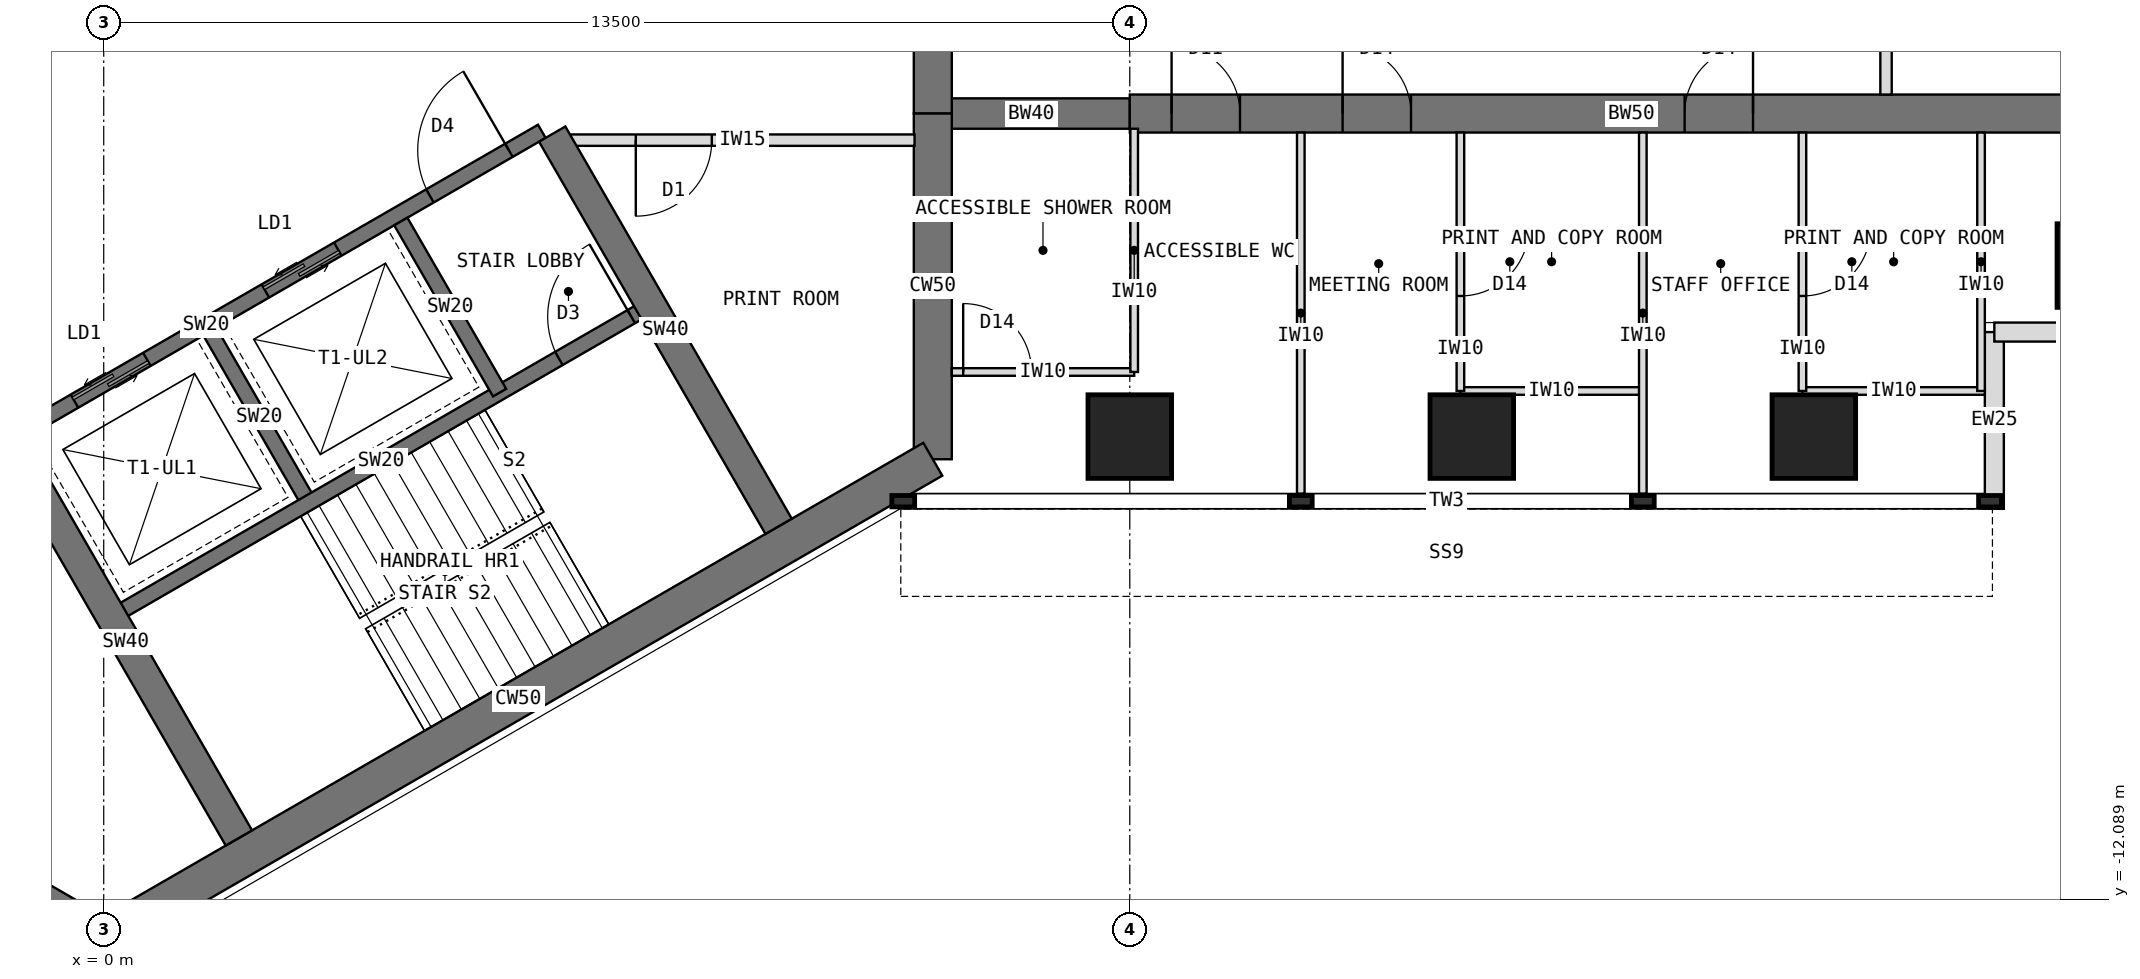
"""IFC4 building model, lengths in metres.
Left out: names, types, materials, properties, quantities, classifications, styles, units other than length and angle.
Written with IfcOpenShell. Run it as: python <this file> out.ifc"""

import sys

from ifc_helpers import new_model, si_unit, direction, frame, frame_2d, origin, origin_2d, place, context, subcontext, project, spatial, rectangle, extrude, element, fill, save


model = new_model("IFC4")
c1 = context("Model", 3, precision=1e-05, world=origin(), true_north=direction((0.0, 1.0)))
c2 = subcontext(c1, "Body", "Model", "MODEL_VIEW")
j1 = project(units=[si_unit("LENGTHUNIT", "METRE"), si_unit("PLANEANGLEUNIT", "RADIAN")], contexts=[c1])
p1 = place(None, origin())
s1 = spatial("IfcSite", under=j1, at=p1, CompositionType="ELEMENT")
p2 = place(p1, origin())
s2 = spatial("IfcBuilding", under=s1, at=p2, CompositionType="ELEMENT")
p3 = place(p2, frame((0.0, 0.0, 230.5)))
s3 = spatial("IfcBuildingStorey", under=s2, at=p3, CompositionType="ELEMENT", Elevation=230.5)
p4 = place(p3, frame((10.908, -6.298, 0.0), z_axis=(0.0, 0.0, 1.0), x_axis=(0.0, 1.0, 0.0)))
e1 = element("IfcWall", 1, at=p4, inside=s3, PredefinedType="SHEAR", context=c2, shape_type="SweptSolid", body=[
    extrude(rectangle(XDim=4.548, YDim=0.5, at=frame_2d((2.274, 0.0))), origin(), (0.0, 0.0, 1.0), 4.0),
])
p5 = place(p3, frame((10.908, -1.75, 0.0), z_axis=(0.0, 0.0, 1.0), x_axis=(0.0, 1.0, 0.0)))
e2 = element("IfcWall", 2, at=p5, inside=s3, PredefinedType="SHEAR", context=c2, shape_type="SweptSolid", body=[
    extrude(rectangle(XDim=3.5, YDim=0.5, at=frame_2d((1.75, 0.0))), origin(), (0.0, 0.0, 1.0), 4.0),
])
p6 = place(p5, frame((0.85, 0.0, 0.0)))
e3 = element("IfcOpeningElement", 3, at=p6, cuts=e2, PredefinedType="OPENING", context=c2, shape_type="SweptSolid", body=[
    extrude(rectangle(XDim=1.8, YDim=2.1, at=frame_2d((0.9, 1.05))), frame((0.0, 0.26, 0.0), z_axis=(0.0, -1.0, 0.0), x_axis=(1.0, 0.0, 0.0)), (0.0, 0.0, 1.0), 0.52),
])
p7 = place(p3, frame((-3.939, -10.322, 0.0), z_axis=(0.0, 0.0, 1.0), x_axis=(0.866011268655, -0.500024481964, 0.0)))
e4 = element("IfcWall", 4, at=p7, inside=s3, PredefinedType="SHEAR", context=c2, shape_type="SweptSolid", body=[
    extrude(rectangle(XDim=4.548, YDim=0.5, at=frame_2d((2.274, 0.0))), origin(), (0.0, 0.0, 1.0), 4.0),
])
p8 = place(p3, frame((0.0, -12.596, 0.0), z_axis=(0.0, 0.0, 1.0), x_axis=(0.866021940709, 0.500005998175, 0.0)))
e5 = element("IfcWall", 5, at=p8, inside=s3, PredefinedType="SHEAR", context=c2, shape_type="SweptSolid", body=[
    extrude(rectangle(XDim=12.596, YDim=0.5, at=frame_2d((6.298, 0.0))), origin(), (0.0, 0.0, 1.0), 4.0),
])
p9 = place(p3, frame((10.908, -1.75, 0.0), z_axis=(0.0, 0.0, 1.0), x_axis=(1.0, 0.0, 0.0)))
e6 = element("IfcWall", 6, at=p9, inside=s3, PredefinedType="SHEAR", context=c2, shape_type="SweptSolid", body=[
    extrude(rectangle(XDim=2.592, YDim=0.4, at=frame_2d((1.296, 0.0))), origin(), (0.0, 0.0, 1.0), 4.0),
])
p10 = place(p3, frame((13.5, -1.75, 0.0), z_axis=(0.0, 0.0, 1.0), x_axis=(1.0, 0.0, 0.0)))
e7 = element("IfcWall", 7, at=p10, inside=s3, PredefinedType="SHEAR", context=c2, shape_type="SweptSolid", body=[
    extrude(rectangle(XDim=13.2, YDim=0.5, at=frame_2d((6.6, 0.0))), origin(), (0.0, 0.0, 1.0), 4.0),
])
p11 = place(p10, frame((0.55, 0.0, 0.0)))
e8 = element("IfcOpeningElement", 8, at=p11, cuts=e7, PredefinedType="OPENING", context=c2, shape_type="SweptSolid", body=[
    extrude(rectangle(XDim=0.9, YDim=2.1, at=frame_2d((0.45, 1.05))), frame((0.0, 0.26, 0.0), z_axis=(0.0, -1.0, 0.0), x_axis=(1.0, 0.0, 0.0)), (0.0, 0.0, 1.0), 0.52),
])
p12 = place(p10, frame((2.8, 0.0, 0.0)))
e9 = element("IfcOpeningElement", 9, at=p12, cuts=e7, PredefinedType="OPENING", context=c2, shape_type="SweptSolid", body=[
    extrude(rectangle(XDim=0.9, YDim=2.1, at=frame_2d((0.45, 1.05))), frame((0.0, 0.26, 0.0), z_axis=(0.0, -1.0, 0.0), x_axis=(1.0, 0.0, 0.0)), (0.0, 0.0, 1.0), 0.52),
])
p13 = place(p10, frame((7.3, 0.0, 0.0)))
e10 = element("IfcOpeningElement", 10, at=p13, cuts=e7, PredefinedType="OPENING", context=c2, shape_type="SweptSolid", body=[
    extrude(rectangle(XDim=0.9, YDim=2.1, at=frame_2d((0.45, 1.05))), frame((0.0, 0.26, 0.0), z_axis=(0.0, -1.0, 0.0), x_axis=(1.0, 0.0, 0.0)), (0.0, 0.0, 1.0), 0.52),
])
for number, where, z_axis, x_axis in (
    (11, (13.5, -6.0, 0.0), (0.0, 0.0, 1.0), (1.0, 0.0, 0.0)),
    (12, (18.0, -6.0, 0.0), (0.0, 0.0, 1.0), (1.0, 0.0, 0.0)),
    (13, (22.5, -6.0, 0.0), (0.0, 0.0, 1.0), (1.0, 0.0, 0.0)),
    (14, (26.25, -3.75, 0.0), (0.0, 0.0, 1.0), (1.0, 0.0, 0.0)),
):
    element("IfcColumn", number, at=place(p3, frame(where, z_axis=z_axis, x_axis=x_axis)), inside=s3, PredefinedType="COLUMN", context=c2, shape_type="SweptSolid", body=[
        extrude(rectangle(XDim=1.1, YDim=1.1, at=origin_2d()), origin(), (0.0, 0.0, 1.0), 4.0),
    ])
for number, where, z_axis, x_axis in (
    (15, (24.875, -6.95, 0.0), (0.0, 0.0, 1.0), (0.0, 1.0, 0.0)),
    (16, (24.875, -4.625, 0.0), (0.0, 0.0, 1.0), (1.0, 0.0, 0.0)),
):
    element("IfcWall", number, at=place(p3, frame(where, z_axis=z_axis, x_axis=x_axis)), inside=s3, PredefinedType="STANDARD", context=c2, shape_type="SweptSolid", body=[
        extrude(rectangle(XDim=2.325, YDim=0.25, at=frame_2d((1.163, 0.0))), origin(), (0.0, 0.0, 1.0), 3.8),
    ])
p14 = place(p3, frame((-1.164, -5.984, 0.0), z_axis=(0.0, 0.0, 1.0), x_axis=(0.866026010844, 0.49999894854, 0.0)))
e17 = element("IfcWall", 17, at=p14, inside=s3, PredefinedType="SHEAR", context=c2, shape_type="SweptSolid", body=[
    extrude(rectangle(XDim=8.0, YDim=0.2, at=frame_2d((4.0, 0.0))), origin(), (0.0, 0.0, 1.0), 4.0),
])
p15 = place(p14, frame((6.3, 0.0, 0.0)))
e18 = element("IfcOpeningElement", 18, at=p15, cuts=e17, PredefinedType="OPENING", context=c2, shape_type="SweptSolid", body=[
    extrude(rectangle(XDim=1.2, YDim=2.1, at=frame_2d((0.6, 1.05))), frame((0.0, 0.11, 0.0), z_axis=(0.0, -1.0, 0.0), x_axis=(1.0, 0.0, 0.0)), (0.0, 0.0, 1.0), 0.22),
])
p16 = place(p14, frame((0.9, 0.0, 0.0)))
e19 = element("IfcOpeningElement", 19, at=p16, cuts=e17, PredefinedType="OPENING", context=c2, shape_type="SweptSolid", body=[
    extrude(rectangle(XDim=1.1, YDim=2.2, at=frame_2d((0.55, 1.1))), frame((0.0, 0.11, 0.0), z_axis=(0.0, -1.0, 0.0), x_axis=(1.0, 0.0, 0.0)), (0.0, 0.0, 1.0), 0.22),
])
p17 = place(p14, frame((3.8, 0.0, 0.0)))
e20 = element("IfcOpeningElement", 20, at=p17, cuts=e17, PredefinedType="OPENING", context=c2, shape_type="SweptSolid", body=[
    extrude(rectangle(XDim=1.1, YDim=2.2, at=frame_2d((0.55, 1.1))), frame((0.0, 0.11, 0.0), z_axis=(0.0, -1.0, 0.0), x_axis=(1.0, 0.0, 0.0)), (0.0, 0.0, 1.0), 0.22),
])
p18 = place(p3, frame((1.397, -4.62, 0.0), z_axis=(0.0, 0.0, 1.0), x_axis=(0.499936506574, -0.866062058628, 0.0)))
e21 = element("IfcWall", 21, at=p18, inside=s3, PredefinedType="SHEAR", context=c2, shape_type="SweptSolid", body=[
    extrude(rectangle(XDim=2.6, YDim=0.2, at=frame_2d((1.3, 0.0))), origin(), (0.0, 0.0, 1.0), 4.0),
])
p19 = place(p3, frame((3.909, -3.17, 0.0), z_axis=(0.0, 0.0, 1.0), x_axis=(0.49997716683, -0.86603858612, 0.0)))
e22 = element("IfcWall", 22, at=p19, inside=s3, PredefinedType="SHEAR", context=c2, shape_type="SweptSolid", body=[
    extrude(rectangle(XDim=2.6, YDim=0.2, at=frame_2d((1.3, 0.0))), origin(), (0.0, 0.0, 1.0), 4.0),
])
p20 = place(p3, frame((0.186, -8.322, 0.0), z_axis=(0.0, 0.0, 1.0), x_axis=(0.866026010844, 0.49999894854, 0.0)))
e23 = element("IfcWall", 23, at=p20, inside=s3, PredefinedType="SHEAR", context=c2, shape_type="SweptSolid", body=[
    extrude(rectangle(XDim=8.0, YDim=0.2, at=frame_2d((4.0, 0.0))), origin(), (0.0, 0.0, 1.0), 4.0),
])
p21 = place(p20, frame((6.7, 0.0, 0.0)))
e24 = element("IfcOpeningElement", 24, at=p21, cuts=e23, PredefinedType="OPENING", context=c2, shape_type="SweptSolid", body=[
    extrude(rectangle(XDim=1.1, YDim=2.1, at=frame_2d((0.55, 1.05))), frame((0.0, 0.11, 0.0), z_axis=(0.0, -1.0, 0.0), x_axis=(1.0, 0.0, 0.0)), (0.0, 0.0, 1.0), 0.22),
])
p22 = place(p3, frame((5.901, -2.02, 0.0), z_axis=(0.0, 0.0, 1.0), x_axis=(0.500003832394, -0.86602319114, 0.0)))
e25 = element("IfcWall", 25, at=p22, inside=s3, PredefinedType="SHEAR", context=c2, shape_type="SweptSolid", body=[
    extrude(rectangle(XDim=5.958, YDim=0.4, at=frame_2d((2.979, 0.0))), origin(), (0.0, 0.0, 1.0), 4.0),
])
p23 = place(p3, frame((-1.201, -6.12, 0.0), z_axis=(0.0, 0.0, 1.0), x_axis=(0.500021575205, -0.866012946976, 0.0)))
e26 = element("IfcWall", 26, at=p23, inside=s3, PredefinedType="SHEAR", context=c2, shape_type="SweptSolid", body=[
    extrude(rectangle(XDim=5.958, YDim=0.4, at=frame_2d((2.979, 0.0))), origin(), (0.0, 0.0, 1.0), 4.0),
])
for number, where, z_axis, x_axis in (
    (27, (15.75, -2.0, 0.0), (0.0, 0.0, 1.0), (0.0, -1.0, 0.0)),
    (28, (20.25, -2.0, 0.0), (0.0, 0.0, 1.0), (0.0, -1.0, 0.0)),
):
    element("IfcWall", number, at=place(p3, frame(where, z_axis=z_axis, x_axis=x_axis)), inside=s3, PredefinedType="PARTITIONING", context=c2, shape_type="SweptSolid", body=[
        extrude(rectangle(XDim=4.75, YDim=0.1, at=frame_2d((2.375, 0.0))), origin(), (0.0, 0.0, 1.0), 3.8),
    ])
p24 = place(p3, frame((17.85, -5.4, 0.0), z_axis=(0.0, 0.0, 1.0), x_axis=(1.0, 0.0, 0.0)))
e29 = element("IfcWall", 29, at=p24, inside=s3, PredefinedType="PARTITIONING", context=c2, shape_type="SweptSolid", body=[
    extrude(rectangle(XDim=2.4, YDim=0.1, at=frame_2d((1.2, 0.0))), origin(), (0.0, 0.0, 1.0), 3.8),
])
p25 = place(p3, frame((17.85, -2.0, 0.0), z_axis=(0.0, 0.0, 1.0), x_axis=(0.0, -1.0, 0.0)))
e30 = element("IfcWall", 30, at=p25, inside=s3, PredefinedType="PARTITIONING", context=c2, shape_type="SweptSolid", body=[
    extrude(rectangle(XDim=3.4, YDim=0.1, at=frame_2d((1.7, 0.0))), origin(), (0.0, 0.0, 1.0), 3.8),
])
p26 = place(p25, frame((1.25, 0.0, 0.0)))
e31 = element("IfcOpeningElement", 31, at=p26, cuts=e30, PredefinedType="OPENING", context=c2, shape_type="SweptSolid", body=[
    extrude(rectangle(XDim=0.9, YDim=2.1, at=frame_2d((0.45, 1.05))), frame((0.0, 0.06, 0.0), z_axis=(0.0, -1.0, 0.0), x_axis=(1.0, 0.0, 0.0)), (0.0, 0.0, 1.0), 0.12),
])
p27 = place(p3, frame((22.35, -5.4, 0.0), z_axis=(0.0, 0.0, 1.0), x_axis=(1.0, 0.0, 0.0)))
e32 = element("IfcWall", 32, at=p27, inside=s3, PredefinedType="PARTITIONING", context=c2, shape_type="SweptSolid", body=[
    extrude(rectangle(XDim=2.4, YDim=0.1, at=frame_2d((1.2, 0.0))), origin(), (0.0, 0.0, 1.0), 3.8),
])
p28 = place(p3, frame((22.35, -2.0, 0.0), z_axis=(0.0, 0.0, 1.0), x_axis=(0.0, -1.0, 0.0)))
e33 = element("IfcWall", 33, at=p28, inside=s3, PredefinedType="PARTITIONING", context=c2, shape_type="SweptSolid", body=[
    extrude(rectangle(XDim=3.4, YDim=0.1, at=frame_2d((1.7, 0.0))), origin(), (0.0, 0.0, 1.0), 3.8),
])
p29 = place(p28, frame((1.25, 0.0, 0.0)))
e34 = element("IfcOpeningElement", 34, at=p29, cuts=e33, PredefinedType="OPENING", context=c2, shape_type="SweptSolid", body=[
    extrude(rectangle(XDim=0.9, YDim=2.1, at=frame_2d((0.45, 1.05))), frame((0.0, 0.06, 0.0), z_axis=(0.0, -1.0, 0.0), x_axis=(1.0, 0.0, 0.0)), (0.0, 0.0, 1.0), 0.12),
])
p30 = place(p3, frame((24.7, -2.0, 0.0), z_axis=(0.0, 0.0, 1.0), x_axis=(0.0, -1.0, 0.0)))
e35 = element("IfcWall", 35, at=p30, inside=s3, PredefinedType="PARTITIONING", context=c2, shape_type="SweptSolid", body=[
    extrude(rectangle(XDim=3.4, YDim=0.1, at=frame_2d((1.7, 0.0))), origin(), (0.0, 0.0, 1.0), 3.8),
])
p31 = place(p3, frame((11.158, -5.15, 0.0), z_axis=(0.0, 0.0, 1.0), x_axis=(1.0, 0.0, 0.0)))
e36 = element("IfcWall", 36, at=p31, inside=s3, PredefinedType="PARTITIONING", context=c2, shape_type="SweptSolid", body=[
    extrude(rectangle(XDim=2.4, YDim=0.1, at=frame_2d((1.2, 0.0))), origin(), (0.0, 0.0, 1.0), 3.8),
])
p32 = place(p31, frame((0.15, 0.0, 0.0)))
e37 = element("IfcOpeningElement", 37, at=p32, cuts=e36, PredefinedType="OPENING", context=c2, shape_type="SweptSolid", body=[
    extrude(rectangle(XDim=0.9, YDim=2.1, at=frame_2d((0.45, 1.05))), frame((0.0, 0.06, 0.0), z_axis=(0.0, -1.0, 0.0), x_axis=(1.0, 0.0, 0.0)), (0.0, 0.0, 1.0), 0.12),
])
p33 = place(p3, frame((13.558, -1.95, 0.0), z_axis=(0.0, 0.0, 1.0), x_axis=(0.0, -1.0, 0.0)))
e38 = element("IfcWall", 38, at=p33, inside=s3, PredefinedType="PARTITIONING", context=c2, shape_type="SweptSolid", body=[
    extrude(rectangle(XDim=3.2, YDim=0.1, at=frame_2d((1.6, 0.0))), origin(), (0.0, 0.0, 1.0), 3.267),
])
p34 = place(p3, frame((10.668, -2.1, 0.0), z_axis=(0.0, 0.0, 1.0), x_axis=(-1.0, 0.0, 0.0)))
e39 = element("IfcWall", 39, at=p34, inside=s3, PredefinedType="PARTITIONING", context=c2, shape_type="SweptSolid", body=[
    extrude(rectangle(XDim=4.526, YDim=0.15, at=frame_2d((2.263, 0.0))), origin(), (0.0, 0.0, 1.0), 3.8),
])
p35 = place(p34, frame((2.668, 0.0, 0.0)))
e40 = element("IfcOpeningElement", 40, at=p35, cuts=e39, PredefinedType="OPENING", context=c2, shape_type="SweptSolid", body=[
    extrude(rectangle(XDim=1.0, YDim=2.1, at=frame_2d((0.5, 1.05))), frame((0.0, 0.085, 0.0), z_axis=(0.0, -1.0, 0.0), x_axis=(1.0, 0.0, 0.0)), (0.0, 0.0, 1.0), 0.17),
])
p36 = place(p3, frame((23.45, -1.5, 0.0), z_axis=(0.0, 0.0, 1.0), x_axis=(0.0, 1.0, 0.0)))
e41 = element("IfcWall", 41, at=p36, inside=s3, PredefinedType="PARTITIONING", context=c2, shape_type="SweptSolid", body=[
    extrude(rectangle(XDim=3.0, YDim=0.15, at=frame_2d((1.5, 0.0))), origin(), (0.0, 0.0, 1.0), 3.8),
])
p37 = place(p36, frame((1.0, 0.0, 0.0)))
e42 = element("IfcOpeningElement", 42, at=p37, cuts=e41, PredefinedType="OPENING", context=c2, shape_type="SweptSolid", body=[
    extrude(rectangle(XDim=1.0, YDim=2.1, at=frame_2d((0.5, 1.05))), frame((0.0, 0.085, 0.0), z_axis=(0.0, -1.0, 0.0), x_axis=(1.0, 0.0, 0.0)), (0.0, 0.0, 1.0), 0.17),
])
p38 = place(p15, origin())
e43 = element("IfcDoor", 43, at=p38, inside=s3, OperationType="SINGLE_SWING_RIGHT", PredefinedType="DOOR", context=c2, shape_type="SweptSolid", body=[
    extrude(rectangle(XDim=1.2, YDim=2.1, at=frame_2d((0.6, 1.05))), frame((0.0, 0.025, 0.0), z_axis=(0.0, -1.0, 0.0), x_axis=(1.0, 0.0, 0.0)), (0.0, 0.0, 1.0), 0.05),
])
fill(e18, e43)
p39 = place(p16, origin())
e44 = element("IfcDoor", 44, at=p39, inside=s3, OperationType="DOUBLE_DOOR_SLIDING", PredefinedType="DOOR", context=c2, shape_type="SweptSolid", body=[
    extrude(rectangle(XDim=1.1, YDim=2.2, at=frame_2d((0.55, 1.1))), frame((0.0, 0.025, 0.0), z_axis=(0.0, -1.0, 0.0), x_axis=(1.0, 0.0, 0.0)), (0.0, 0.0, 1.0), 0.05),
])
fill(e19, e44)
p40 = place(p17, origin())
e45 = element("IfcDoor", 45, at=p40, inside=s3, OperationType="DOUBLE_DOOR_SLIDING", PredefinedType="DOOR", context=c2, shape_type="SweptSolid", body=[
    extrude(rectangle(XDim=1.1, YDim=2.2, at=frame_2d((0.55, 1.1))), frame((0.0, 0.025, 0.0), z_axis=(0.0, -1.0, 0.0), x_axis=(1.0, 0.0, 0.0)), (0.0, 0.0, 1.0), 0.05),
])
fill(e20, e45)
p41 = place(p21, origin())
e46 = element("IfcDoor", 46, at=p41, inside=s3, OperationType="SINGLE_SWING_RIGHT", PredefinedType="DOOR", context=c2, shape_type="SweptSolid", body=[
    extrude(rectangle(XDim=1.1, YDim=2.1, at=frame_2d((0.55, 1.05))), frame((0.0, 0.025, 0.0), z_axis=(0.0, -1.0, 0.0), x_axis=(1.0, 0.0, 0.0)), (0.0, 0.0, 1.0), 0.05),
])
fill(e24, e46)
p42 = place(p26, origin())
e47 = element("IfcDoor", 47, at=p42, inside=s3, OperationType="SINGLE_SWING_LEFT", PredefinedType="DOOR", context=c2, shape_type="SweptSolid", body=[
    extrude(rectangle(XDim=0.9, YDim=2.1, at=frame_2d((0.45, 1.05))), frame((0.0, 0.025, 0.0), z_axis=(0.0, -1.0, 0.0), x_axis=(1.0, 0.0, 0.0)), (0.0, 0.0, 1.0), 0.05),
])
fill(e31, e47)
p43 = place(p29, origin())
e48 = element("IfcDoor", 48, at=p43, inside=s3, OperationType="SINGLE_SWING_LEFT", PredefinedType="DOOR", context=c2, shape_type="SweptSolid", body=[
    extrude(rectangle(XDim=0.9, YDim=2.1, at=frame_2d((0.45, 1.05))), frame((0.0, 0.025, 0.0), z_axis=(0.0, -1.0, 0.0), x_axis=(1.0, 0.0, 0.0)), (0.0, 0.0, 1.0), 0.05),
])
fill(e34, e48)
p44 = place(p32, origin())
e49 = element("IfcDoor", 49, at=p44, inside=s3, OperationType="SINGLE_SWING_LEFT", PredefinedType="DOOR", context=c2, shape_type="SweptSolid", body=[
    extrude(rectangle(XDim=0.9, YDim=2.1, at=frame_2d((0.45, 1.05))), frame((0.0, 0.025, 0.0), z_axis=(0.0, -1.0, 0.0), x_axis=(1.0, 0.0, 0.0)), (0.0, 0.0, 1.0), 0.05),
])
fill(e37, e49)
p45 = place(p35, origin())
e50 = element("IfcDoor", 50, at=p45, inside=s3, OperationType="SINGLE_SWING_RIGHT", PredefinedType="DOOR", context=c2, shape_type="SweptSolid", body=[
    extrude(rectangle(XDim=1.0, YDim=2.1, at=frame_2d((0.5, 1.05))), frame((0.0, 0.025, 0.0), z_axis=(0.0, -1.0, 0.0), x_axis=(1.0, 0.0, 0.0)), (0.0, 0.0, 1.0), 0.05),
])
fill(e40, e50)
p46 = place(p11, origin())
e51 = element("IfcDoor", 51, at=p46, inside=s3, OperationType="SINGLE_SWING_LEFT", PredefinedType="DOOR", context=c2, shape_type="SweptSolid", body=[
    extrude(rectangle(XDim=0.9, YDim=2.1, at=frame_2d((0.45, 1.05))), frame((0.0, 0.025, 0.0), z_axis=(0.0, -1.0, 0.0), x_axis=(1.0, 0.0, 0.0)), (0.0, 0.0, 1.0), 0.05),
])
fill(e8, e51)
p47 = place(p12, origin())
e52 = element("IfcDoor", 52, at=p47, inside=s3, OperationType="SINGLE_SWING_LEFT", PredefinedType="DOOR", context=c2, shape_type="SweptSolid", body=[
    extrude(rectangle(XDim=0.9, YDim=2.1, at=frame_2d((0.45, 1.05))), frame((0.0, 0.025, 0.0), z_axis=(0.0, -1.0, 0.0), x_axis=(1.0, 0.0, 0.0)), (0.0, 0.0, 1.0), 0.05),
])
fill(e9, e52)
p48 = place(p13, origin())
e53 = element("IfcDoor", 53, at=p48, inside=s3, OperationType="SINGLE_SWING_RIGHT", PredefinedType="DOOR", context=c2, shape_type="SweptSolid", body=[
    extrude(rectangle(XDim=0.9, YDim=2.1, at=frame_2d((0.45, 1.05))), frame((0.0, 0.025, 0.0), z_axis=(0.0, -1.0, 0.0), x_axis=(1.0, 0.0, 0.0)), (0.0, 0.0, 1.0), 0.05),
])
fill(e10, e53)
save(model, sys.argv[1])
